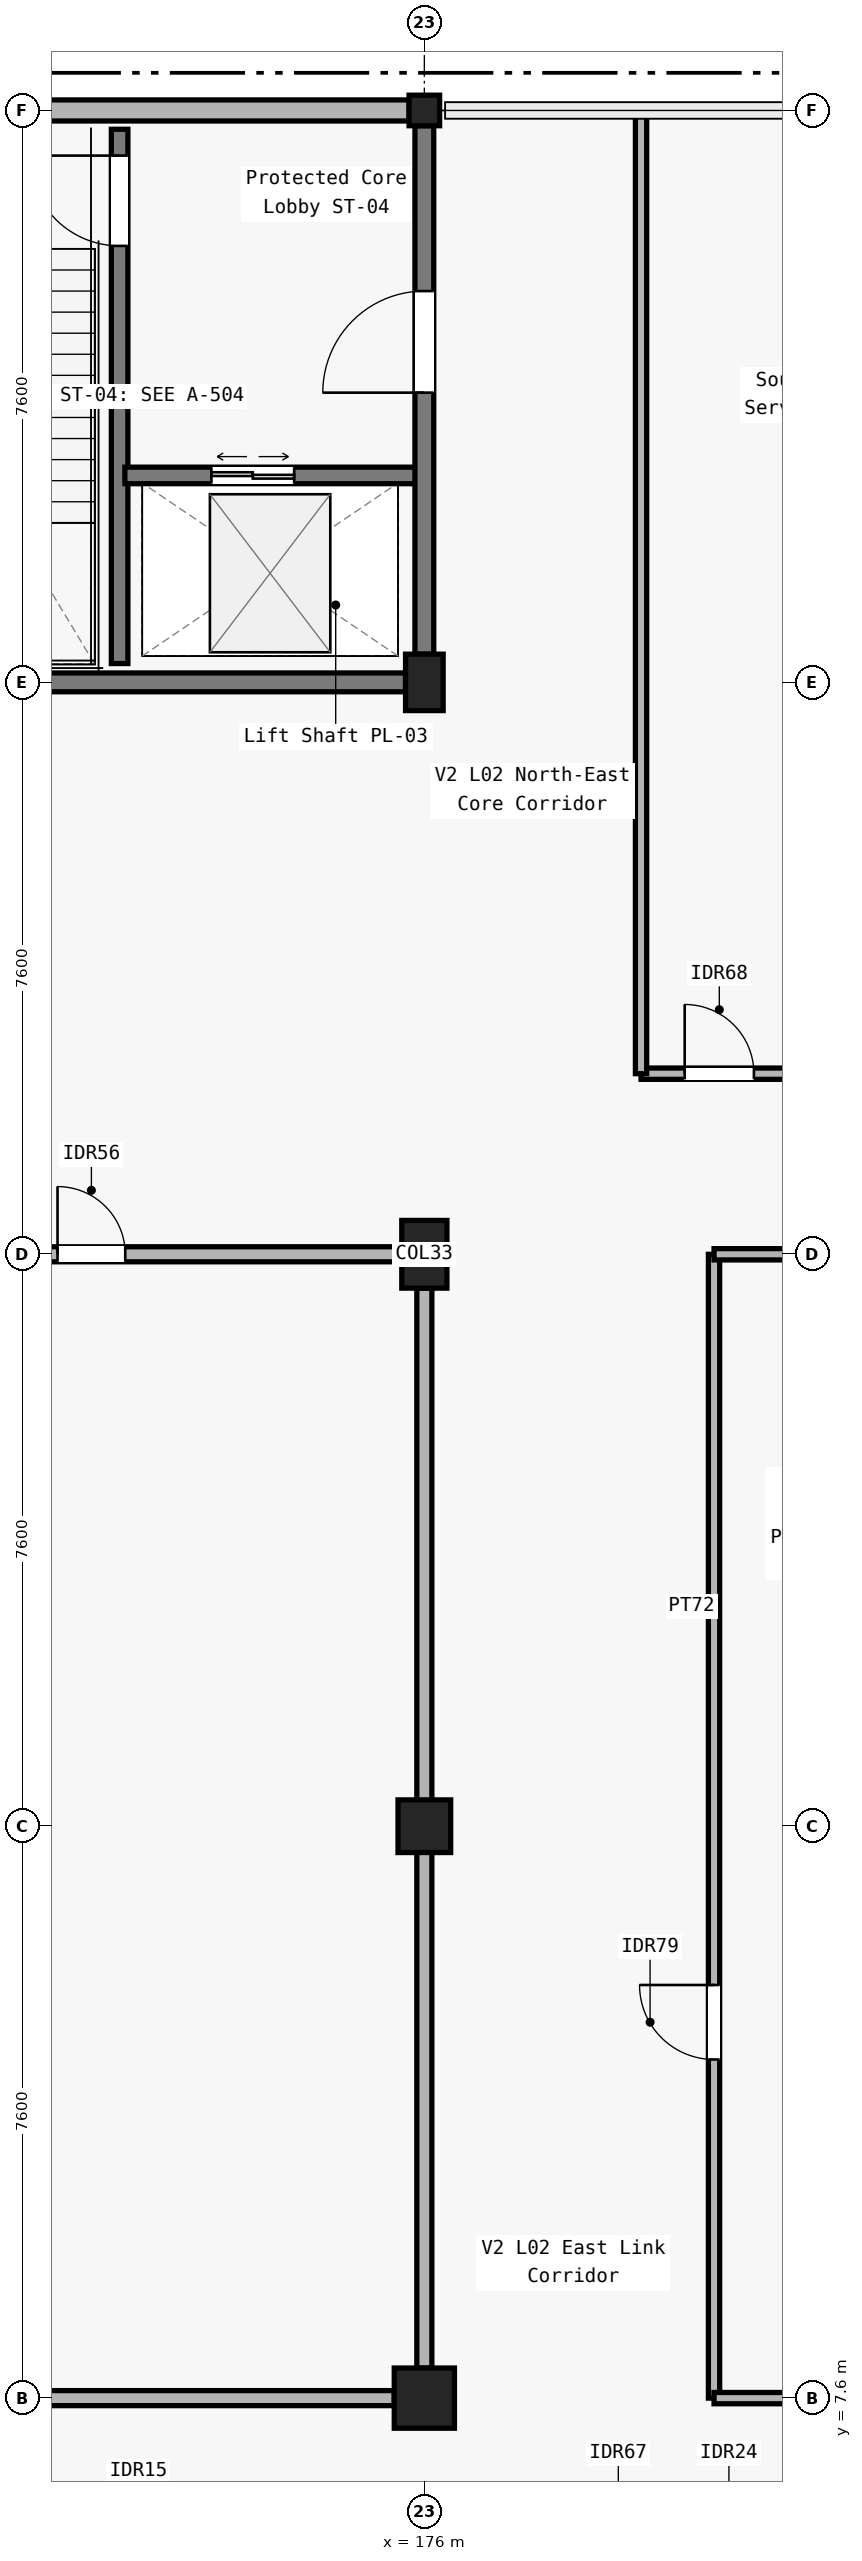
"""IFC4 building model, lengths in metres.
Left out: names, types, materials, properties, quantities, classifications, styles, units other than length and angle.
Written with IfcOpenShell. Run it as: python <this file> out.ifc"""

import sys

from ifc_helpers import new_model, si_unit, direction, frame, frame_2d, origin, origin_2d, place, context, subcontext, project, spatial, rectangle, hollow_circle, extrude, element, fill, save


model = new_model("IFC4")
c1 = context("Model", 3, precision=1e-05, world=origin(), true_north=direction((0.0, 1.0)))
c2 = subcontext(c1, "Body", "Model", "MODEL_VIEW")
j1 = project(units=[si_unit("LENGTHUNIT", "METRE"), si_unit("PLANEANGLEUNIT", "RADIAN")], contexts=[c1])
p1 = place(None, origin())
s1 = spatial("IfcSite", under=j1, at=p1, CompositionType="ELEMENT")
p2 = place(p1, origin())
s2 = spatial("IfcBuilding", under=s1, at=p2, CompositionType="ELEMENT")
p3 = place(p2, frame((0.0, 0.0, 10.2)))
s3 = spatial("IfcBuildingStorey", under=s2, at=p3, CompositionType="ELEMENT", Elevation=10.2)
p4 = place(p3, frame((176.0, 7.6, 0.0), z_axis=(0.0, 0.0, 1.0), x_axis=(1.0, 0.0, 0.0)))
e1 = element("IfcColumn", 1, at=p4, inside=s3, PredefinedType="COLUMN", context=c2, shape_type="SweptSolid", body=[
    extrude(rectangle(XDim=0.8, YDim=0.8, at=origin_2d()), origin(), (0.0, 0.0, 1.0), 4.8),
])
p5 = place(p3, frame((176.0, 15.2, 0.0), z_axis=(0.0, 0.0, 1.0), x_axis=(1.0, 0.0, 0.0)))
e2 = element("IfcColumn", 2, at=p5, inside=s3, PredefinedType="COLUMN", context=c2, shape_type="SweptSolid", body=[
    extrude(rectangle(XDim=0.7, YDim=0.7, at=origin_2d()), origin(), (0.0, 0.0, 1.0), 4.8),
])
p6 = place(p3, frame((176.0, 22.8, 0.0), z_axis=(0.0, 0.0, 1.0), x_axis=(1.0, 0.0, 0.0)))
e3 = element("IfcColumn", 3, at=p6, inside=s3, PredefinedType="COLUMN", context=c2, shape_type="SweptSolid", body=[
    extrude(rectangle(XDim=0.6, YDim=0.9, at=origin_2d()), origin(), (0.0, 0.0, 1.0), 4.8),
])
p7 = place(p3, frame((176.0, 30.4, 0.0), z_axis=(0.0, 0.0, 1.0), x_axis=(1.0, 0.0, 0.0)))
e4 = element("IfcColumn", 4, at=p7, inside=s3, PredefinedType="COLUMN", context=c2, shape_type="SweptSolid", body=[
    extrude(rectangle(XDim=0.5, YDim=0.75, at=origin_2d()), origin(), (0.0, 0.0, 1.0), 4.8),
])
p8 = place(p3, frame((176.0, 38.0, 0.0), z_axis=(0.0, 0.0, 1.0), x_axis=(1.0, 0.0, 0.0)))
e5 = element("IfcColumn", 5, at=p8, inside=s3, PredefinedType="COLUMN", context=c2, shape_type="SweptSolid", body=[
    extrude(hollow_circle(Radius=0.203, WallThickness=0.02, at=origin_2d()), origin(), (0.0, 0.0, 1.0), 4.8),
])
p9 = place(p3, frame((168.15, 38.0, 0.0), z_axis=(0.0, 0.0, 1.0), x_axis=(1.0, 0.0, 0.0)))
e6 = element("IfcWall", 6, at=p9, inside=s3, PredefinedType="SOLIDWALL", context=c2, shape_type="SweptSolid", body=[
    extrude(rectangle(XDim=7.647, YDim=0.28, at=frame_2d((3.823, 0.0))), origin(), (0.0, 0.0, 1.0), 3.86),
])
p10 = place(p3, frame((168.3, 30.4, 0.0), z_axis=(0.0, 0.0, 1.0), x_axis=(1.0, 0.0, 0.0)))
e7 = element("IfcWall", 7, at=p10, inside=s3, PredefinedType="SOLIDWALL", context=c2, shape_type="SweptSolid", body=[
    extrude(rectangle(XDim=7.45, YDim=0.25, at=frame_2d((3.725, 0.0))), origin(), (0.0, 0.0, 1.0), 3.66),
])
p11 = place(p3, frame((171.95, 30.65, 0.0), z_axis=(0.0, 0.0, 1.0), x_axis=(0.0, 1.0, 0.0)))
e8 = element("IfcWall", 8, at=p11, inside=s3, PredefinedType="SOLIDWALL", context=c2, shape_type="SweptSolid", body=[
    extrude(rectangle(XDim=7.1, YDim=0.22, at=frame_2d((3.55, 0.0))), origin(), (0.0, 0.0, 1.0), 4.52),
])
p12 = place(p11, frame((5.55, 0.0, 0.0)))
e9 = element("IfcOpeningElement", 9, at=p12, cuts=e8, PredefinedType="OPENING", context=c2, shape_type="SweptSolid", body=[
    extrude(rectangle(XDim=1.2, YDim=2.15, at=frame_2d((0.6, 1.075))), frame((0.0, 0.12, 0.0), z_axis=(0.0, -1.0, 0.0), x_axis=(1.0, 0.0, 0.0)), (0.0, 0.0, 1.0), 0.24),
])
p13 = place(p3, frame((172.02, 33.15, 0.0), z_axis=(0.0, 0.0, 1.0), x_axis=(1.0, 0.0, 0.0)))
e10 = element("IfcWall", 10, at=p13, inside=s3, PredefinedType="SOLIDWALL", context=c2, shape_type="SweptSolid", body=[
    extrude(rectangle(XDim=3.93, YDim=0.22, at=frame_2d((1.965, 0.0))), origin(), (0.0, 0.0, 1.0), 3.82),
])
p14 = place(p13, frame((1.15, 0.0, 0.0)))
e11 = element("IfcOpeningElement", 11, at=p14, cuts=e10, PredefinedType="OPENING", context=c2, shape_type="SweptSolid", body=[
    extrude(rectangle(XDim=1.1, YDim=2.2, at=frame_2d((0.55, 1.1))), frame((0.0, 0.12, 0.0), z_axis=(0.0, -1.0, 0.0), x_axis=(1.0, 0.0, 0.0)), (0.0, 0.0, 1.0), 0.24),
])
p15 = place(p3, frame((176.0, 30.775, 0.0), z_axis=(0.0, 0.0, 1.0), x_axis=(0.0, 1.0, 0.0)))
e12 = element("IfcWall", 12, at=p15, inside=s3, PredefinedType="SOLIDWALL", context=c2, shape_type="SweptSolid", body=[
    extrude(rectangle(XDim=7.022, YDim=0.25, at=frame_2d((3.511, 0.0))), origin(), (0.0, 0.0, 1.0), 3.645),
])
p16 = place(p15, frame((3.475, 0.0, 0.0)))
e13 = element("IfcOpeningElement", 13, at=p16, cuts=e12, PredefinedType="OPENING", context=c2, shape_type="SweptSolid", body=[
    extrude(rectangle(XDim=1.35, YDim=2.2, at=frame_2d((0.675, 1.1))), frame((0.0, 0.135, 0.0), z_axis=(0.0, -1.0, 0.0), x_axis=(1.0, 0.0, 0.0)), (0.0, 0.0, 1.0), 0.27),
])
p17 = place(p3, frame((152.325, 22.8, 0.0), z_axis=(0.0, 0.0, 1.0), x_axis=(1.0, 0.0, 0.0)))
e14 = element("IfcWall", 14, at=p17, inside=s3, PredefinedType="PARTITIONING", context=c2, shape_type="SweptSolid", body=[
    extrude(rectangle(XDim=23.375, YDim=0.2, at=frame_2d((11.688, 0.0))), origin(), (0.0, 0.0, 1.0), 3.56),
])
p18 = place(p17, frame((3.4, 0.0, 0.0)))
e15 = element("IfcOpeningElement", 15, at=p18, cuts=e14, PredefinedType="OPENING", context=c2, shape_type="SweptSolid", body=[
    extrude(rectangle(XDim=1.0, YDim=2.05, at=frame_2d((0.5, 1.025))), frame((0.0, 0.11, 0.0), z_axis=(0.0, -1.0, 0.0), x_axis=(1.0, 0.0, 0.0)), (0.0, 0.0, 1.0), 0.22),
])
p19 = place(p17, frame((18.8, 0.0, 0.0)))
e16 = element("IfcOpeningElement", 16, at=p19, cuts=e14, PredefinedType="OPENING", context=c2, shape_type="SweptSolid", body=[
    extrude(rectangle(XDim=0.9, YDim=2.1, at=frame_2d((0.45, 1.05))), frame((0.0, 0.11, 0.0), z_axis=(0.0, -1.0, 0.0), x_axis=(1.0, 0.0, 0.0)), (0.0, 0.0, 1.0), 0.22),
])
p20 = place(p3, frame((176.0, 8.0, 0.0), z_axis=(0.0, 0.0, 1.0), x_axis=(0.0, 1.0, 0.0)))
e17 = element("IfcWall", 17, at=p20, inside=s3, PredefinedType="PARTITIONING", context=c2, shape_type="SweptSolid", body=[
    extrude(rectangle(XDim=14.35, YDim=0.2, at=frame_2d((7.175, 0.0))), origin(), (0.0, 0.0, 1.0), 3.56),
])
p21 = place(p3, frame((152.25, 7.6, 0.0), z_axis=(0.0, 0.0, 1.0), x_axis=(1.0, 0.0, 0.0)))
e18 = element("IfcWall", 18, at=p21, inside=s3, PredefinedType="PARTITIONING", context=c2, shape_type="SweptSolid", body=[
    extrude(rectangle(XDim=23.35, YDim=0.2, at=frame_2d((11.675, 0.0))), origin(), (0.0, 0.0, 1.0), 3.56),
])
p22 = place(p3, frame((179.85, 7.6, 0.0), z_axis=(0.0, 0.0, 1.0), x_axis=(0.0, 1.0, 0.0)))
e19 = element("IfcWall", 19, at=p22, inside=s3, PredefinedType="PARTITIONING", context=c2, shape_type="SweptSolid", body=[
    extrude(rectangle(XDim=15.2, YDim=0.15, at=frame_2d((7.6, 0.0))), origin(), (0.0, 0.0, 1.0), 3.82),
])
p23 = place(p22, frame((4.5, 0.0, 0.0)))
e20 = element("IfcOpeningElement", 20, at=p23, cuts=e19, PredefinedType="OPENING", context=c2, shape_type="SweptSolid", body=[
    extrude(rectangle(XDim=0.99, YDim=2.1, at=frame_2d((0.495, 1.05))), frame((0.0, 0.085, 0.0), z_axis=(0.0, -1.0, 0.0), x_axis=(1.0, 0.0, 0.0)), (0.0, 0.0, 1.0), 0.17),
])
p24 = place(p3, frame((179.85, 7.6, 0.0), z_axis=(0.0, 0.0, 1.0), x_axis=(1.0, 0.0, 0.0)))
e21 = element("IfcWall", 21, at=p24, inside=s3, PredefinedType="PARTITIONING", context=c2, shape_type="SweptSolid", body=[
    extrude(rectangle(XDim=4.0, YDim=0.15, at=frame_2d((2.0, 0.0))), origin(), (0.0, 0.0, 1.0), 3.745),
])
p25 = place(p3, frame((179.85, 22.8, 0.0), z_axis=(0.0, 0.0, 1.0), x_axis=(1.0, 0.0, 0.0)))
e22 = element("IfcWall", 22, at=p25, inside=s3, PredefinedType="PARTITIONING", context=c2, shape_type="SweptSolid", body=[
    extrude(rectangle(XDim=4.0, YDim=0.15, at=frame_2d((2.0, 0.0))), origin(), (0.0, 0.0, 1.0), 3.89),
])
p26 = place(p3, frame((178.88, 25.2, 0.0), z_axis=(0.0, 0.0, 1.0), x_axis=(1.0, 0.0, 0.0)))
e23 = element("IfcWall", 23, at=p26, inside=s3, PredefinedType="PARTITIONING", context=c2, shape_type="SweptSolid", body=[
    extrude(rectangle(XDim=5.04, YDim=0.15, at=frame_2d((2.52, 0.0))), origin(), (0.0, 0.0, 1.0), 3.89),
])
p27 = place(p26, frame((0.58, 0.0, 0.0)))
e24 = element("IfcOpeningElement", 24, at=p27, cuts=e23, PredefinedType="OPENING", context=c2, shape_type="SweptSolid", body=[
    extrude(rectangle(XDim=0.92, YDim=2.05, at=frame_2d((0.46, 1.025))), frame((0.0, 0.085, 0.0), z_axis=(0.0, -1.0, 0.0), x_axis=(1.0, 0.0, 0.0)), (0.0, 0.0, 1.0), 0.17),
])
p28 = place(p3, frame((178.88, 25.2, 0.0), z_axis=(0.0, 0.0, 1.0), x_axis=(0.0, 1.0, 0.0)))
e25 = element("IfcWall", 25, at=p28, inside=s3, PredefinedType="PARTITIONING", context=c2, shape_type="SweptSolid", body=[
    extrude(rectangle(XDim=12.72, YDim=0.15, at=frame_2d((6.36, 0.0))), origin(), (0.0, 0.0, 1.0), 3.645),
])
p29 = place(p12, origin())
e26 = element("IfcDoor", 26, at=p29, inside=s3, OperationType="SINGLE_SWING_RIGHT", PredefinedType="DOOR", context=c2, shape_type="SweptSolid", body=[
    extrude(rectangle(XDim=1.2, YDim=2.15, at=frame_2d((0.6, 1.075))), frame((0.0, 0.025, 0.0), z_axis=(0.0, -1.0, 0.0), x_axis=(1.0, 0.0, 0.0)), (0.0, 0.0, 1.0), 0.05),
])
fill(e9, e26)
p30 = place(p14, origin())
e27 = element("IfcDoor", 27, at=p30, inside=s3, OperationType="DOUBLE_DOOR_SLIDING", PredefinedType="DOOR", context=c2, shape_type="SweptSolid", body=[
    extrude(rectangle(XDim=1.1, YDim=2.2, at=frame_2d((0.55, 1.1))), frame((0.0, 0.025, 0.0), z_axis=(0.0, -1.0, 0.0), x_axis=(1.0, 0.0, 0.0)), (0.0, 0.0, 1.0), 0.05),
])
fill(e11, e27)
p31 = place(p16, origin())
e28 = element("IfcDoor", 28, at=p31, inside=s3, OperationType="SINGLE_SWING_LEFT", PredefinedType="DOOR", context=c2, shape_type="SweptSolid", body=[
    extrude(rectangle(XDim=1.35, YDim=2.2, at=frame_2d((0.675, 1.1))), frame((0.0, 0.025, 0.0), z_axis=(0.0, -1.0, 0.0), x_axis=(1.0, 0.0, 0.0)), (0.0, 0.0, 1.0), 0.05),
])
fill(e13, e28)
p32 = place(p19, origin())
e29 = element("IfcDoor", 29, at=p32, inside=s3, OperationType="SINGLE_SWING_LEFT", PredefinedType="DOOR", context=c2, shape_type="SweptSolid", body=[
    extrude(rectangle(XDim=0.9, YDim=2.1, at=frame_2d((0.45, 1.05))), frame((0.0, 0.025, 0.0), z_axis=(0.0, -1.0, 0.0), x_axis=(1.0, 0.0, 0.0)), (0.0, 0.0, 1.0), 0.05),
])
fill(e16, e29)
p33 = place(p23, origin())
e30 = element("IfcDoor", 30, at=p33, inside=s3, OperationType="SINGLE_SWING_RIGHT", PredefinedType="DOOR", context=c2, shape_type="SweptSolid", body=[
    extrude(rectangle(XDim=0.99, YDim=2.1, at=frame_2d((0.495, 1.05))), frame((0.0, 0.025, 0.0), z_axis=(0.0, -1.0, 0.0), x_axis=(1.0, 0.0, 0.0)), (0.0, 0.0, 1.0), 0.05),
])
fill(e20, e30)
p34 = place(p27, origin())
e31 = element("IfcDoor", 31, at=p34, inside=s3, OperationType="SINGLE_SWING_LEFT", PredefinedType="DOOR", context=c2, shape_type="SweptSolid", body=[
    extrude(rectangle(XDim=0.92, YDim=2.05, at=frame_2d((0.46, 1.025))), frame((0.0, 0.025, 0.0), z_axis=(0.0, -1.0, 0.0), x_axis=(1.0, 0.0, 0.0)), (0.0, 0.0, 1.0), 0.05),
])
fill(e24, e31)
save(model, sys.argv[1])
